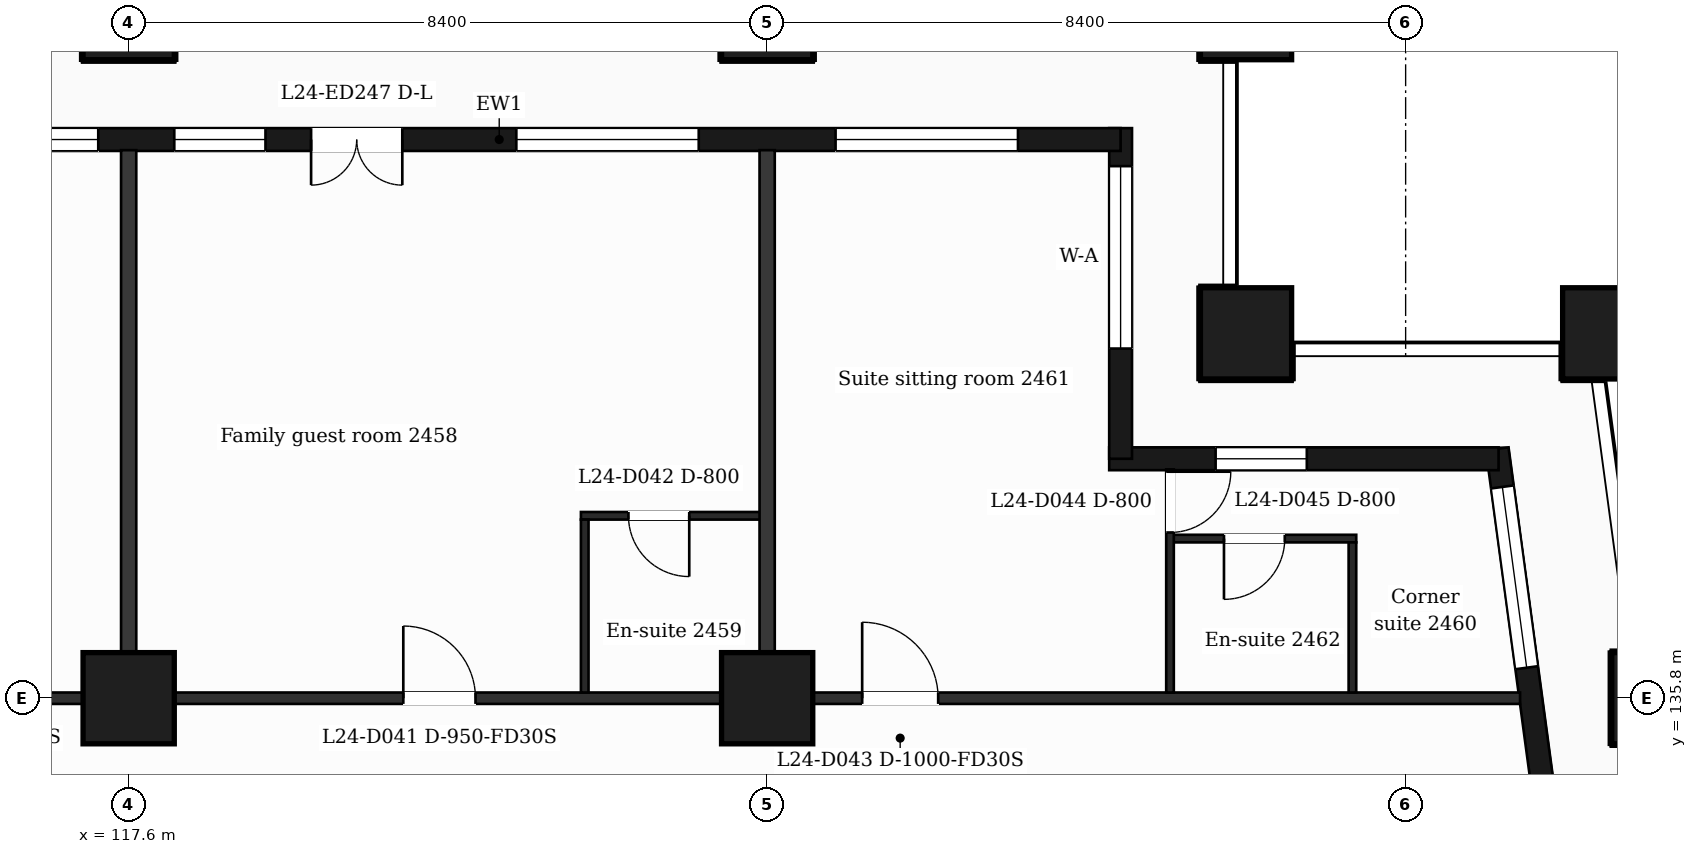
"""IFC4 building model, lengths in metres.
Left out: names, types, materials, properties, quantities, classifications, styles, units other than length and angle.
Written with IfcOpenShell. Run it as: python <this file> out.ifc"""

import sys

from ifc_helpers import new_model, si_unit, direction, frame, frame_2d, origin, origin_2d, place, context, subcontext, project, spatial, rectangle, extrude, element, fill, save


model = new_model("IFC4")
c1 = context("Model", 3, precision=1e-05, world=origin(), true_north=direction((0.0, 1.0)))
c2 = subcontext(c1, "Body", "Model", "MODEL_VIEW")
j1 = project(units=[si_unit("LENGTHUNIT", "METRE"), si_unit("PLANEANGLEUNIT", "RADIAN")], contexts=[c1])
p1 = place(None, origin())
s1 = spatial("IfcSite", under=j1, at=p1, CompositionType="ELEMENT")
p2 = place(p1, origin())
s2 = spatial("IfcBuilding", under=s1, at=p2, CompositionType="ELEMENT")
p3 = place(p2, frame((0.0, 0.0, 105.8)))
s3 = spatial("IfcBuildingStorey", under=s2, at=p3, CompositionType="ELEMENT", Elevation=105.8)
for number, where, z_axis, x_axis in (
    (1, (132.3, 140.6, 0.0), (0.0, 0.0, 1.0), (1.0, 0.0, 0.0)),
    (2, (137.065, 140.6, 0.0), (0.0, 0.0, 1.0), (1.0, 0.0, 0.0)),
    (3, (117.6, 135.8, 0.0), (0.0, 0.0, 1.0), (1.0, 0.0, 0.0)),
    (4, (126.0, 135.8, 0.0), (0.0, 0.0, 1.0), (1.0, 0.0, 0.0)),
    (5, (137.711, 135.8, 0.0), (0.0, 0.0, 1.0), (1.0, 0.0, 0.0)),
    (6, (117.6, 144.8, 0.0), (0.0, 0.0, 1.0), (1.0, 0.0, 0.0)),
    (7, (126.0, 144.8, 0.0), (0.0, 0.0, 1.0), (1.0, 0.0, 0.0)),
    (8, (132.3, 144.8, 0.0), (0.0, 0.0, 1.0), (1.0, 0.0, 0.0)),
):
    element("IfcColumn", number, at=place(p3, frame(where, z_axis=z_axis, x_axis=x_axis)), inside=s3, PredefinedType="COLUMN", context=c2, shape_type="SweptSolid", body=[
        extrude(rectangle(XDim=1.2, YDim=1.2, at=origin_2d()), origin(), (0.0, 0.0, 1.0), 3.7),
    ])
p4 = place(p3, frame((136.504, 132.4, 0.0), z_axis=(0.0, 0.0, 1.0), x_axis=(-0.133399697462, 0.99106231929, 0.0)))
e9 = element("IfcWall", 9, at=p4, inside=s3, PredefinedType="SOLIDWALL", context=c2, shape_type="SweptSolid", body=[
    extrude(rectangle(XDim=6.74, YDim=0.3, at=frame_2d((3.37, 0.0))), origin(), (0.0, 0.0, 1.0), 3.38),
])
p5 = place(p4, frame((1.115, 0.0, 0.0)))
e10 = element("IfcOpeningElement", 10, at=p5, cuts=e9, PredefinedType="OPENING", context=c2, shape_type="SweptSolid", body=[
    extrude(rectangle(XDim=1.2, YDim=2.4, at=frame_2d((0.6, 1.2))), frame((0.0, 0.16, 0.0), z_axis=(0.0, -1.0, 0.0), x_axis=(1.0, 0.0, 0.0)), (0.0, 0.0, 1.0), 0.32),
])
p6 = place(p4, frame((3.835, 0.0, 0.9)))
e11 = element("IfcOpeningElement", 11, at=p6, cuts=e9, PredefinedType="OPENING", context=c2, shape_type="SweptSolid", body=[
    extrude(rectangle(XDim=2.4, YDim=2.1, at=frame_2d((1.2, 1.05))), frame((0.0, 0.16, 0.0), z_axis=(0.0, -1.0, 0.0), x_axis=(1.0, 0.0, 0.0)), (0.0, 0.0, 1.0), 0.32),
])
p7 = place(p3, frame((135.623, 138.95, 0.0), z_axis=(0.0, 0.0, 1.0), x_axis=(-1.0, 0.0, 0.0)))
e12 = element("IfcWall", 12, at=p7, inside=s3, PredefinedType="SOLIDWALL", context=c2, shape_type="SweptSolid", body=[
    extrude(rectangle(XDim=5.123, YDim=0.3, at=frame_2d((2.561, 0.0))), origin(), (0.0, 0.0, 1.0), 3.38),
])
p8 = place(p7, frame((2.523, 0.0, 0.9)))
e13 = element("IfcOpeningElement", 13, at=p8, cuts=e12, PredefinedType="OPENING", context=c2, shape_type="SweptSolid", body=[
    extrude(rectangle(XDim=1.2, YDim=2.1, at=frame_2d((0.6, 1.05))), frame((0.0, 0.16, 0.0), z_axis=(0.0, -1.0, 0.0), x_axis=(1.0, 0.0, 0.0)), (0.0, 0.0, 1.0), 0.32),
])
p9 = place(p3, frame((130.65, 138.95, 0.0), z_axis=(0.0, 0.0, 1.0), x_axis=(0.0, 1.0, 0.0)))
e14 = element("IfcWall", 14, at=p9, inside=s3, PredefinedType="SOLIDWALL", context=c2, shape_type="SweptSolid", body=[
    extrude(rectangle(XDim=4.35, YDim=0.3, at=frame_2d((2.175, 0.0))), origin(), (0.0, 0.0, 1.0), 3.38),
])
p10 = place(p9, frame((1.45, 0.0, 0.9)))
e15 = element("IfcOpeningElement", 15, at=p10, cuts=e14, PredefinedType="OPENING", context=c2, shape_type="SweptSolid", body=[
    extrude(rectangle(XDim=2.4, YDim=2.1, at=frame_2d((1.2, 1.05))), frame((0.0, 0.16, 0.0), z_axis=(0.0, -1.0, 0.0), x_axis=(1.0, 0.0, 0.0)), (0.0, 0.0, 1.0), 0.32),
])
p11 = place(p3, frame((130.65, 143.15, 0.0), z_axis=(0.0, 0.0, 1.0), x_axis=(-1.0, 0.0, 0.0)))
e16 = element("IfcWall", 16, at=p11, inside=s3, PredefinedType="SOLIDWALL", context=c2, shape_type="SweptSolid", body=[
    extrude(rectangle(XDim=16.35, YDim=0.3, at=frame_2d((8.175, 0.0))), origin(), (0.0, 0.0, 1.0), 3.38),
])
p12 = place(p11, frame((1.35, 0.0, 0.9)))
e17 = element("IfcOpeningElement", 17, at=p12, cuts=e16, PredefinedType="OPENING", context=c2, shape_type="SweptSolid", body=[
    extrude(rectangle(XDim=2.4, YDim=2.1, at=frame_2d((1.2, 1.05))), frame((0.0, 0.16, 0.0), z_axis=(0.0, -1.0, 0.0), x_axis=(1.0, 0.0, 0.0)), (0.0, 0.0, 1.0), 0.32),
])
p13 = place(p11, frame((5.55, 0.0, 0.9)))
e18 = element("IfcOpeningElement", 18, at=p13, cuts=e16, PredefinedType="OPENING", context=c2, shape_type="SweptSolid", body=[
    extrude(rectangle(XDim=2.4, YDim=2.1, at=frame_2d((1.2, 1.05))), frame((0.0, 0.16, 0.0), z_axis=(0.0, -1.0, 0.0), x_axis=(1.0, 0.0, 0.0)), (0.0, 0.0, 1.0), 0.32),
])
p14 = place(p11, frame((9.45, 0.0, 0.0)))
e19 = element("IfcOpeningElement", 19, at=p14, cuts=e16, PredefinedType="OPENING", context=c2, shape_type="SweptSolid", body=[
    extrude(rectangle(XDim=1.2, YDim=2.4, at=frame_2d((0.6, 1.2))), frame((0.0, 0.16, 0.0), z_axis=(0.0, -1.0, 0.0), x_axis=(1.0, 0.0, 0.0)), (0.0, 0.0, 1.0), 0.32),
])
p15 = place(p11, frame((11.25, 0.0, 0.9)))
e20 = element("IfcOpeningElement", 20, at=p15, cuts=e16, PredefinedType="OPENING", context=c2, shape_type="SweptSolid", body=[
    extrude(rectangle(XDim=1.2, YDim=2.1, at=frame_2d((0.6, 1.05))), frame((0.0, 0.16, 0.0), z_axis=(0.0, -1.0, 0.0), x_axis=(1.0, 0.0, 0.0)), (0.0, 0.0, 1.0), 0.32),
])
p16 = place(p11, frame((13.45, 0.0, 0.9)))
e21 = element("IfcOpeningElement", 21, at=p16, cuts=e16, PredefinedType="OPENING", context=c2, shape_type="SweptSolid", body=[
    extrude(rectangle(XDim=2.4, YDim=2.1, at=frame_2d((1.2, 1.05))), frame((0.0, 0.16, 0.0), z_axis=(0.0, -1.0, 0.0), x_axis=(1.0, 0.0, 0.0)), (0.0, 0.0, 1.0), 0.32),
])
p17 = place(p3, frame((90.895, 135.8, 0.0), z_axis=(0.0, 0.0, 1.0), x_axis=(1.0, 0.0, 0.0)))
e22 = element("IfcWall", 22, at=p17, inside=s3, PredefinedType="PARTITIONING", context=c2, shape_type="SweptSolid", body=[
    extrude(rectangle(XDim=45.011, YDim=0.15, at=frame_2d((22.505, 0.0))), origin(), (0.0, 0.0, 1.0), 3.38),
])
p18 = place(p17, frame((7.455, 0.0, 0.0)))
e23 = element("IfcOpeningElement", 23, at=p18, cuts=e22, PredefinedType="OPENING", context=c2, shape_type="SweptSolid", body=[
    extrude(rectangle(XDim=1.0, YDim=2.1, at=frame_2d((0.5, 1.05))), frame((0.0, 0.085, 0.0), z_axis=(0.0, -1.0, 0.0), x_axis=(1.0, 0.0, 0.0)), (0.0, 0.0, 1.0), 0.17),
])
p19 = place(p17, frame((10.892, 0.0, 0.0)))
e24 = element("IfcOpeningElement", 24, at=p19, cuts=e22, PredefinedType="OPENING", context=c2, shape_type="SweptSolid", body=[
    extrude(rectangle(XDim=0.95, YDim=2.1, at=frame_2d((0.475, 1.05))), frame((0.0, 0.085, 0.0), z_axis=(0.0, -1.0, 0.0), x_axis=(1.0, 0.0, 0.0)), (0.0, 0.0, 1.0), 0.17),
])
p20 = place(p17, frame((23.68, 0.0, 0.0)))
e25 = element("IfcOpeningElement", 25, at=p20, cuts=e22, PredefinedType="OPENING", context=c2, shape_type="SweptSolid", body=[
    extrude(rectangle(XDim=1.0, YDim=2.1, at=frame_2d((0.5, 1.05))), frame((0.0, 0.085, 0.0), z_axis=(0.0, -1.0, 0.0), x_axis=(1.0, 0.0, 0.0)), (0.0, 0.0, 1.0), 0.17),
])
p21 = place(p17, frame((30.318, 0.0, 0.0)))
e26 = element("IfcOpeningElement", 26, at=p21, cuts=e22, PredefinedType="OPENING", context=c2, shape_type="SweptSolid", body=[
    extrude(rectangle(XDim=0.95, YDim=2.1, at=frame_2d((0.475, 1.05))), frame((0.0, 0.085, 0.0), z_axis=(0.0, -1.0, 0.0), x_axis=(1.0, 0.0, 0.0)), (0.0, 0.0, 1.0), 0.17),
])
p22 = place(p17, frame((36.355, 0.0, 0.0)))
e27 = element("IfcOpeningElement", 27, at=p22, cuts=e22, PredefinedType="OPENING", context=c2, shape_type="SweptSolid", body=[
    extrude(rectangle(XDim=1.0, YDim=2.1, at=frame_2d((0.5, 1.05))), frame((0.0, 0.085, 0.0), z_axis=(0.0, -1.0, 0.0), x_axis=(1.0, 0.0, 0.0)), (0.0, 0.0, 1.0), 0.17),
])
p23 = place(p3, frame((131.3, 137.9, 0.0), z_axis=(0.0, 0.0, 1.0), x_axis=(1.0, 0.0, 0.0)))
e28 = element("IfcWall", 28, at=p23, inside=s3, PredefinedType="PARTITIONING", context=c2, shape_type="SweptSolid", body=[
    extrude(rectangle(XDim=2.45, YDim=0.1, at=frame_2d((1.225, 0.0))), origin(), (0.0, 0.0, 1.0), 3.38),
])
p24 = place(p23, frame((0.71, 0.0, 0.0)))
e29 = element("IfcOpeningElement", 29, at=p24, cuts=e28, PredefinedType="OPENING", context=c2, shape_type="SweptSolid", body=[
    extrude(rectangle(XDim=0.8, YDim=2.1, at=frame_2d((0.4, 1.05))), frame((0.0, 0.06, 0.0), z_axis=(0.0, -1.0, 0.0), x_axis=(1.0, 0.0, 0.0)), (0.0, 0.0, 1.0), 0.12),
])
p25 = place(p3, frame((123.55, 138.2, 0.0), z_axis=(0.0, 0.0, 1.0), x_axis=(1.0, 0.0, 0.0)))
e30 = element("IfcWall", 30, at=p25, inside=s3, PredefinedType="PARTITIONING", context=c2, shape_type="SweptSolid", body=[
    extrude(rectangle(XDim=2.45, YDim=0.1, at=frame_2d((1.225, 0.0))), origin(), (0.0, 0.0, 1.0), 3.38),
])
p26 = place(p25, frame((0.625, 0.0, 0.0)))
e31 = element("IfcOpeningElement", 31, at=p26, cuts=e30, PredefinedType="OPENING", context=c2, shape_type="SweptSolid", body=[
    extrude(rectangle(XDim=0.8, YDim=2.1, at=frame_2d((0.4, 1.05))), frame((0.0, 0.06, 0.0), z_axis=(0.0, -1.0, 0.0), x_axis=(1.0, 0.0, 0.0)), (0.0, 0.0, 1.0), 0.12),
])
p27 = place(p3, frame((117.6, 135.875, 0.0), z_axis=(0.0, 0.0, 1.0), x_axis=(0.0, 1.0, 0.0)))
e32 = element("IfcWall", 32, at=p27, inside=s3, PredefinedType="PARTITIONING", context=c2, shape_type="SweptSolid", body=[
    extrude(rectangle(XDim=7.135, YDim=0.2, at=frame_2d((3.567, 0.0))), origin(), (0.0, 0.0, 1.0), 3.38),
])
p28 = place(p3, frame((123.6, 135.875, 0.0), z_axis=(0.0, 0.0, 1.0), x_axis=(0.0, 1.0, 0.0)))
e33 = element("IfcWall", 33, at=p28, inside=s3, PredefinedType="PARTITIONING", context=c2, shape_type="SweptSolid", body=[
    extrude(rectangle(XDim=2.275, YDim=0.1, at=frame_2d((1.137, 0.0))), origin(), (0.0, 0.0, 1.0), 3.38),
])
p29 = place(p3, frame((126.0, 135.875, 0.0), z_axis=(0.0, 0.0, 1.0), x_axis=(0.0, 1.0, 0.0)))
e34 = element("IfcWall", 34, at=p29, inside=s3, PredefinedType="PARTITIONING", context=c2, shape_type="SweptSolid", body=[
    extrude(rectangle(XDim=7.135, YDim=0.2, at=frame_2d((3.567, 0.0))), origin(), (0.0, 0.0, 1.0), 3.38),
])
p30 = place(p3, frame((131.3, 135.875, 0.0), z_axis=(0.0, 0.0, 1.0), x_axis=(0.0, 1.0, 0.0)))
e35 = element("IfcWall", 35, at=p30, inside=s3, PredefinedType="PARTITIONING", context=c2, shape_type="SweptSolid", body=[
    extrude(rectangle(XDim=2.935, YDim=0.1, at=frame_2d((1.468, 0.0))), origin(), (0.0, 0.0, 1.0), 3.38),
])
p31 = place(p30, frame((2.105, 0.0, 0.0)))
e36 = element("IfcOpeningElement", 36, at=p31, cuts=e35, PredefinedType="OPENING", context=c2, shape_type="SweptSolid", body=[
    extrude(rectangle(XDim=0.8, YDim=2.1, at=frame_2d((0.4, 1.05))), frame((0.0, 0.06, 0.0), z_axis=(0.0, -1.0, 0.0), x_axis=(1.0, 0.0, 0.0)), (0.0, 0.0, 1.0), 0.12),
])
p32 = place(p3, frame((133.7, 135.875, 0.0), z_axis=(0.0, 0.0, 1.0), x_axis=(0.0, 1.0, 0.0)))
e37 = element("IfcWall", 37, at=p32, inside=s3, PredefinedType="PARTITIONING", context=c2, shape_type="SweptSolid", body=[
    extrude(rectangle(XDim=1.975, YDim=0.1, at=frame_2d((0.988, 0.0))), origin(), (0.0, 0.0, 1.0), 3.38),
])
p33 = place(p6, origin())
e38 = element("IfcWindow", 38, at=p33, inside=s3, PartitioningType="SINGLE_PANEL", PredefinedType="WINDOW", context=c2, shape_type="SweptSolid", body=[
    extrude(rectangle(XDim=2.4, YDim=2.1, at=frame_2d((1.2, 1.05))), frame((0.0, 0.03, 0.0), z_axis=(0.0, -1.0, 0.0), x_axis=(1.0, 0.0, 0.0)), (0.0, 0.0, 1.0), 0.06),
])
fill(e11, e38)
p34 = place(p8, origin())
e39 = element("IfcWindow", 39, at=p34, inside=s3, PartitioningType="SINGLE_PANEL", PredefinedType="WINDOW", context=c2, shape_type="SweptSolid", body=[
    extrude(rectangle(XDim=1.2, YDim=2.1, at=frame_2d((0.6, 1.05))), frame((0.0, 0.03, 0.0), z_axis=(0.0, -1.0, 0.0), x_axis=(1.0, 0.0, 0.0)), (0.0, 0.0, 1.0), 0.06),
])
fill(e13, e39)
p35 = place(p10, origin())
e40 = element("IfcWindow", 40, at=p35, inside=s3, PartitioningType="SINGLE_PANEL", PredefinedType="WINDOW", context=c2, shape_type="SweptSolid", body=[
    extrude(rectangle(XDim=2.4, YDim=2.1, at=frame_2d((1.2, 1.05))), frame((0.0, 0.03, 0.0), z_axis=(0.0, -1.0, 0.0), x_axis=(1.0, 0.0, 0.0)), (0.0, 0.0, 1.0), 0.06),
])
fill(e15, e40)
p36 = place(p12, origin())
e41 = element("IfcWindow", 41, at=p36, inside=s3, PartitioningType="SINGLE_PANEL", PredefinedType="WINDOW", context=c2, shape_type="SweptSolid", body=[
    extrude(rectangle(XDim=2.4, YDim=2.1, at=frame_2d((1.2, 1.05))), frame((0.0, 0.03, 0.0), z_axis=(0.0, -1.0, 0.0), x_axis=(1.0, 0.0, 0.0)), (0.0, 0.0, 1.0), 0.06),
])
fill(e17, e41)
p37 = place(p13, origin())
e42 = element("IfcWindow", 42, at=p37, inside=s3, PartitioningType="SINGLE_PANEL", PredefinedType="WINDOW", context=c2, shape_type="SweptSolid", body=[
    extrude(rectangle(XDim=2.4, YDim=2.1, at=frame_2d((1.2, 1.05))), frame((0.0, 0.03, 0.0), z_axis=(0.0, -1.0, 0.0), x_axis=(1.0, 0.0, 0.0)), (0.0, 0.0, 1.0), 0.06),
])
fill(e18, e42)
p38 = place(p14, origin())
e43 = element("IfcDoor", 43, at=p38, inside=s3, OperationType="DOUBLE_DOOR_SINGLE_SWING", PredefinedType="DOOR", context=c2, shape_type="SweptSolid", body=[
    extrude(rectangle(XDim=1.2, YDim=2.4, at=frame_2d((0.6, 1.2))), frame((0.0, 0.025, 0.0), z_axis=(0.0, -1.0, 0.0), x_axis=(1.0, 0.0, 0.0)), (0.0, 0.0, 1.0), 0.05),
])
fill(e19, e43)
p39 = place(p15, origin())
e44 = element("IfcWindow", 44, at=p39, inside=s3, PartitioningType="SINGLE_PANEL", PredefinedType="WINDOW", context=c2, shape_type="SweptSolid", body=[
    extrude(rectangle(XDim=1.2, YDim=2.1, at=frame_2d((0.6, 1.05))), frame((0.0, 0.03, 0.0), z_axis=(0.0, -1.0, 0.0), x_axis=(1.0, 0.0, 0.0)), (0.0, 0.0, 1.0), 0.06),
])
fill(e20, e44)
p40 = place(p16, origin())
e45 = element("IfcWindow", 45, at=p40, inside=s3, PartitioningType="SINGLE_PANEL", PredefinedType="WINDOW", context=c2, shape_type="SweptSolid", body=[
    extrude(rectangle(XDim=2.4, YDim=2.1, at=frame_2d((1.2, 1.05))), frame((0.0, 0.03, 0.0), z_axis=(0.0, -1.0, 0.0), x_axis=(1.0, 0.0, 0.0)), (0.0, 0.0, 1.0), 0.06),
])
fill(e21, e45)
p41 = place(p21, origin())
e46 = element("IfcDoor", 46, at=p41, inside=s3, OperationType="SINGLE_SWING_LEFT", PredefinedType="DOOR", context=c2, shape_type="SweptSolid", body=[
    extrude(rectangle(XDim=0.95, YDim=2.1, at=frame_2d((0.475, 1.05))), frame((0.0, 0.025, 0.0), z_axis=(0.0, -1.0, 0.0), x_axis=(1.0, 0.0, 0.0)), (0.0, 0.0, 1.0), 0.05),
])
fill(e26, e46)
p42 = place(p26, origin())
e47 = element("IfcDoor", 47, at=p42, inside=s3, OperationType="SINGLE_SWING_RIGHT", PredefinedType="DOOR", context=c2, shape_type="SweptSolid", body=[
    extrude(rectangle(XDim=0.8, YDim=2.1, at=frame_2d((0.4, 1.05))), frame((0.0, 0.025, 0.0), z_axis=(0.0, -1.0, 0.0), x_axis=(1.0, 0.0, 0.0)), (0.0, 0.0, 1.0), 0.05),
])
fill(e31, e47)
p43 = place(p22, origin())
e48 = element("IfcDoor", 48, at=p43, inside=s3, OperationType="SINGLE_SWING_LEFT", PredefinedType="DOOR", context=c2, shape_type="SweptSolid", body=[
    extrude(rectangle(XDim=1.0, YDim=2.1, at=frame_2d((0.5, 1.05))), frame((0.0, 0.025, 0.0), z_axis=(0.0, -1.0, 0.0), x_axis=(1.0, 0.0, 0.0)), (0.0, 0.0, 1.0), 0.05),
])
fill(e27, e48)
p44 = place(p31, origin())
e49 = element("IfcDoor", 49, at=p44, inside=s3, OperationType="SINGLE_SWING_RIGHT", PredefinedType="DOOR", context=c2, shape_type="SweptSolid", body=[
    extrude(rectangle(XDim=0.8, YDim=2.1, at=frame_2d((0.4, 1.05))), frame((0.0, 0.025, 0.0), z_axis=(0.0, -1.0, 0.0), x_axis=(1.0, 0.0, 0.0)), (0.0, 0.0, 1.0), 0.05),
])
fill(e36, e49)
p45 = place(p24, origin())
e50 = element("IfcDoor", 50, at=p45, inside=s3, OperationType="SINGLE_SWING_LEFT", PredefinedType="DOOR", context=c2, shape_type="SweptSolid", body=[
    extrude(rectangle(XDim=0.8, YDim=2.1, at=frame_2d((0.4, 1.05))), frame((0.0, 0.025, 0.0), z_axis=(0.0, -1.0, 0.0), x_axis=(1.0, 0.0, 0.0)), (0.0, 0.0, 1.0), 0.05),
])
fill(e29, e50)
save(model, sys.argv[1])
